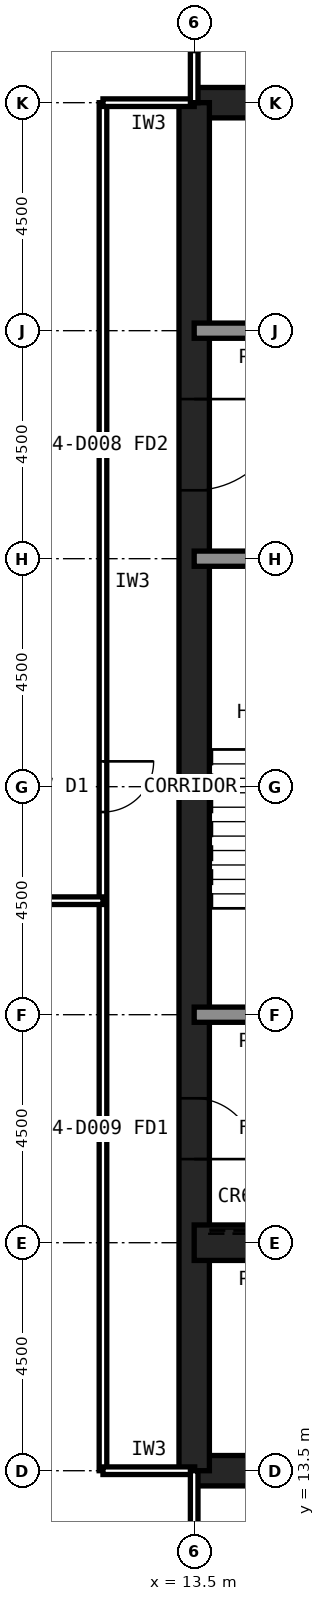
"""IFC4 building model, lengths in metres.
Left out: names, types, materials, properties, quantities, classifications, styles, units other than length and angle.
Written with IfcOpenShell. Run it as: python <this file> out.ifc"""

import sys

from ifc_helpers import new_model, si_unit, direction, frame, frame_2d, origin, place, context, subcontext, project, spatial, rectangle, extrude, element, fill, save


model = new_model("IFC4")
c1 = context("Model", 3, precision=1e-05, world=origin(), true_north=direction((0.0, 1.0)))
c2 = subcontext(c1, "Body", "Model", "MODEL_VIEW")
j1 = project(units=[si_unit("LENGTHUNIT", "METRE"), si_unit("PLANEANGLEUNIT", "RADIAN")], contexts=[c1])
p1 = place(None, origin())
s1 = spatial("IfcSite", under=j1, at=p1, CompositionType="ELEMENT")
p2 = place(p1, origin())
s2 = spatial("IfcBuilding", under=s1, at=p2, CompositionType="ELEMENT")
p3 = place(p2, frame((0.0, 0.0, 62.6)))
s3 = spatial("IfcBuildingStorey", under=s2, at=p3, CompositionType="ELEMENT", Elevation=62.6)
for number, where, z_axis, x_axis in (
    (1, (13.5, 13.5, 0.0), (0.0, 0.0, 1.0), (1.0, 0.0, 0.0)),
    (2, (40.5, 40.5, 0.0), (0.0, 0.0, 1.0), (-1.0, 0.0, 0.0)),
):
    element("IfcWall", number, at=place(p3, frame(where, z_axis=z_axis, x_axis=x_axis)), inside=s3, PredefinedType="SHEAR", context=c2, shape_type="SweptSolid", body=[
        extrude(rectangle(XDim=27.0, YDim=0.6, at=frame_2d((13.5, 0.0))), origin(), (0.0, 0.0, 1.0), 4.2),
    ])
p4 = place(p3, frame((13.5, 40.5, 0.0), z_axis=(0.0, 0.0, 1.0), x_axis=(0.0, -1.0, 0.0)))
e3 = element("IfcWall", 3, at=p4, inside=s3, PredefinedType="SHEAR", context=c2, shape_type="SweptSolid", body=[
    extrude(rectangle(XDim=27.0, YDim=0.6, at=frame_2d((13.5, 0.0))), origin(), (0.0, 0.0, 1.0), 4.2),
])
p5 = place(p4, frame((19.65, 0.0, 0.0)))
e4 = element("IfcOpeningElement", 4, at=p5, cuts=e3, PredefinedType="OPENING", context=c2, shape_type="SweptSolid", body=[
    extrude(rectangle(XDim=1.2, YDim=2.1, at=frame_2d((0.6, 1.05))), frame((0.0, 0.31, 0.0), z_axis=(0.0, -1.0, 0.0), x_axis=(1.0, 0.0, 0.0)), (0.0, 0.0, 1.0), 0.62),
])
p6 = place(p4, frame((5.85, 0.0, 0.0)))
e5 = element("IfcOpeningElement", 5, at=p6, cuts=e3, PredefinedType="OPENING", context=c2, shape_type="SweptSolid", body=[
    extrude(rectangle(XDim=1.8, YDim=2.1, at=frame_2d((0.9, 1.05))), frame((0.0, 0.31, 0.0), z_axis=(0.0, -1.0, 0.0), x_axis=(1.0, 0.0, 0.0)), (0.0, 0.0, 1.0), 0.62),
])
p7 = place(p3, frame((13.5, 18.0, 0.0), z_axis=(0.0, 0.0, 1.0), x_axis=(1.0, 0.0, 0.0)))
e6 = element("IfcWall", 6, at=p7, inside=s3, PredefinedType="SHEAR", context=c2, shape_type="SweptSolid", body=[
    extrude(rectangle(XDim=27.0, YDim=0.7, at=frame_2d((13.5, 0.0))), origin(), (0.0, 0.0, 1.0), 4.2),
])
p8 = place(p7, frame((24.3, 0.0, 0.0)))
e7 = element("IfcOpeningElement", 7, at=p8, cuts=e6, PredefinedType="OPENING", context=c2, shape_type="SweptSolid", body=[
    extrude(rectangle(XDim=0.9, YDim=2.1, at=frame_2d((0.45, 1.05))), frame((0.0, 0.36, 0.0), z_axis=(0.0, -1.0, 0.0), x_axis=(1.0, 0.0, 0.0)), (0.0, 0.0, 1.0), 0.72),
])
p9 = place(p7, frame((5.45, 0.0, 0.0)))
e8 = element("IfcOpeningElement", 8, at=p9, cuts=e6, PredefinedType="OPENING", context=c2, shape_type="SweptSolid", body=[
    extrude(rectangle(XDim=1.1, YDim=2.1, at=frame_2d((0.55, 1.05))), frame((0.0, 0.36, 0.0), z_axis=(0.0, -1.0, 0.0), x_axis=(1.0, 0.0, 0.0)), (0.0, 0.0, 1.0), 0.72),
])
p10 = place(p7, frame((8.45, 0.0, 0.0)))
e9 = element("IfcOpeningElement", 9, at=p10, cuts=e6, PredefinedType="OPENING", context=c2, shape_type="SweptSolid", body=[
    extrude(rectangle(XDim=1.1, YDim=2.1, at=frame_2d((0.55, 1.05))), frame((0.0, 0.36, 0.0), z_axis=(0.0, -1.0, 0.0), x_axis=(1.0, 0.0, 0.0)), (0.0, 0.0, 1.0), 0.72),
])
p11 = place(p7, frame((11.45, 0.0, 0.0)))
e10 = element("IfcOpeningElement", 10, at=p11, cuts=e6, PredefinedType="OPENING", context=c2, shape_type="SweptSolid", body=[
    extrude(rectangle(XDim=1.1, YDim=2.1, at=frame_2d((0.55, 1.05))), frame((0.0, 0.36, 0.0), z_axis=(0.0, -1.0, 0.0), x_axis=(1.0, 0.0, 0.0)), (0.0, 0.0, 1.0), 0.72),
])
p12 = place(p7, frame((14.45, 0.0, 0.0)))
e11 = element("IfcOpeningElement", 11, at=p12, cuts=e6, PredefinedType="OPENING", context=c2, shape_type="SweptSolid", body=[
    extrude(rectangle(XDim=1.1, YDim=2.1, at=frame_2d((0.55, 1.05))), frame((0.0, 0.36, 0.0), z_axis=(0.0, -1.0, 0.0), x_axis=(1.0, 0.0, 0.0)), (0.0, 0.0, 1.0), 0.72),
])
p13 = place(p7, frame((17.45, 0.0, 0.0)))
e12 = element("IfcOpeningElement", 12, at=p13, cuts=e6, PredefinedType="OPENING", context=c2, shape_type="SweptSolid", body=[
    extrude(rectangle(XDim=1.1, YDim=2.1, at=frame_2d((0.55, 1.05))), frame((0.0, 0.36, 0.0), z_axis=(0.0, -1.0, 0.0), x_axis=(1.0, 0.0, 0.0)), (0.0, 0.0, 1.0), 0.72),
])
p14 = place(p7, frame((20.45, 0.0, 0.0)))
e13 = element("IfcOpeningElement", 13, at=p14, cuts=e6, PredefinedType="OPENING", context=c2, shape_type="SweptSolid", body=[
    extrude(rectangle(XDim=1.1, YDim=2.1, at=frame_2d((0.55, 1.05))), frame((0.0, 0.36, 0.0), z_axis=(0.0, -1.0, 0.0), x_axis=(1.0, 0.0, 0.0)), (0.0, 0.0, 1.0), 0.72),
])
p15 = place(p7, frame((1.6, 0.0, 0.0)))
e14 = element("IfcOpeningElement", 14, at=p15, cuts=e6, PredefinedType="OPENING", context=c2, shape_type="SweptSolid", body=[
    extrude(rectangle(XDim=1.3, YDim=2.2, at=frame_2d((0.65, 1.1))), frame((0.0, 0.36, 0.0), z_axis=(0.0, -1.0, 0.0), x_axis=(1.0, 0.0, 0.0)), (0.0, 0.0, 1.0), 0.72),
])
p16 = place(p3, frame((13.5, 36.0, 0.0), z_axis=(0.0, 0.0, 1.0), x_axis=(1.0, 0.0, 0.0)))
e15 = element("IfcWall", 15, at=p16, inside=s3, PredefinedType="SOLIDWALL", context=c2, shape_type="SweptSolid", body=[
    extrude(rectangle(XDim=27.0, YDim=0.3, at=frame_2d((13.5, 0.0))), origin(), (0.0, 0.0, 1.0), 4.04),
])
p17 = place(p16, frame((1.8, 0.0, 0.0)))
e16 = element("IfcOpeningElement", 16, at=p17, cuts=e15, PredefinedType="OPENING", context=c2, shape_type="SweptSolid", body=[
    extrude(rectangle(XDim=0.9, YDim=2.1, at=frame_2d((0.45, 1.05))), frame((0.0, 0.16, 0.0), z_axis=(0.0, -1.0, 0.0), x_axis=(1.0, 0.0, 0.0)), (0.0, 0.0, 1.0), 0.32),
])
p18 = place(p16, frame((24.1, 0.0, 0.0)))
e17 = element("IfcOpeningElement", 17, at=p18, cuts=e15, PredefinedType="OPENING", context=c2, shape_type="SweptSolid", body=[
    extrude(rectangle(XDim=1.3, YDim=2.2, at=frame_2d((0.65, 1.1))), frame((0.0, 0.16, 0.0), z_axis=(0.0, -1.0, 0.0), x_axis=(1.0, 0.0, 0.0)), (0.0, 0.0, 1.0), 0.32),
])
p19 = place(p3, frame((13.5, 22.5, 0.0), z_axis=(0.0, 0.0, 1.0), x_axis=(1.0, 0.0, 0.0)))
e18 = element("IfcWall", 18, at=p19, inside=s3, PredefinedType="SOLIDWALL", context=c2, shape_type="SweptSolid", body=[
    extrude(rectangle(XDim=27.0, YDim=0.3, at=frame_2d((13.5, 0.0))), origin(), (0.0, 0.0, 1.0), 4.04),
])
p20 = place(p19, frame((1.65, 0.0, 0.0)))
e19 = element("IfcOpeningElement", 19, at=p20, cuts=e18, PredefinedType="OPENING", context=c2, shape_type="SweptSolid", body=[
    extrude(rectangle(XDim=1.2, YDim=2.1, at=frame_2d((0.6, 1.05))), frame((0.0, 0.16, 0.0), z_axis=(0.0, -1.0, 0.0), x_axis=(1.0, 0.0, 0.0)), (0.0, 0.0, 1.0), 0.32),
])
p21 = place(p19, frame((6.025, 0.0, 0.0)))
e20 = element("IfcOpeningElement", 20, at=p21, cuts=e18, PredefinedType="OPENING", context=c2, shape_type="SweptSolid", body=[
    extrude(rectangle(XDim=1.0, YDim=2.1, at=frame_2d((0.5, 1.05))), frame((0.0, 0.16, 0.0), z_axis=(0.0, -1.0, 0.0), x_axis=(1.0, 0.0, 0.0)), (0.0, 0.0, 1.0), 0.32),
])
p22 = place(p19, frame((10.525, 0.0, 0.0)))
e21 = element("IfcOpeningElement", 21, at=p22, cuts=e18, PredefinedType="OPENING", context=c2, shape_type="SweptSolid", body=[
    extrude(rectangle(XDim=1.0, YDim=2.1, at=frame_2d((0.5, 1.05))), frame((0.0, 0.16, 0.0), z_axis=(0.0, -1.0, 0.0), x_axis=(1.0, 0.0, 0.0)), (0.0, 0.0, 1.0), 0.32),
])
p23 = place(p19, frame((19.75, 0.0, 0.0)))
e22 = element("IfcOpeningElement", 22, at=p23, cuts=e18, PredefinedType="OPENING", context=c2, shape_type="SweptSolid", body=[
    extrude(rectangle(XDim=1.0, YDim=2.1, at=frame_2d((0.5, 1.05))), frame((0.0, 0.16, 0.0), z_axis=(0.0, -1.0, 0.0), x_axis=(1.0, 0.0, 0.0)), (0.0, 0.0, 1.0), 0.32),
])
p24 = place(p19, frame((15.05, 0.0, 0.0)))
e23 = element("IfcOpeningElement", 23, at=p24, cuts=e18, PredefinedType="OPENING", context=c2, shape_type="SweptSolid", body=[
    extrude(rectangle(XDim=1.4, YDim=2.4, at=frame_2d((0.7, 1.2))), frame((0.0, 0.16, 0.0), z_axis=(0.0, -1.0, 0.0), x_axis=(1.0, 0.0, 0.0)), (0.0, 0.0, 1.0), 0.32),
])
p25 = place(p3, frame((13.5, 31.5, 0.0), z_axis=(0.0, 0.0, 1.0), x_axis=(1.0, 0.0, 0.0)))
e24 = element("IfcWall", 24, at=p25, inside=s3, PredefinedType="SOLIDWALL", context=c2, shape_type="SweptSolid", body=[
    extrude(rectangle(XDim=27.0, YDim=0.3, at=frame_2d((13.5, 0.0))), origin(), (0.0, 0.0, 1.0), 4.04),
])
p26 = place(p25, frame((24.15, 0.0, 0.0)))
e25 = element("IfcOpeningElement", 25, at=p26, cuts=e24, PredefinedType="OPENING", context=c2, shape_type="SweptSolid", body=[
    extrude(rectangle(XDim=1.2, YDim=2.1, at=frame_2d((0.6, 1.05))), frame((0.0, 0.16, 0.0), z_axis=(0.0, -1.0, 0.0), x_axis=(1.0, 0.0, 0.0)), (0.0, 0.0, 1.0), 0.32),
])
p27 = place(p25, frame((15.3, 0.0, 0.0)))
e26 = element("IfcOpeningElement", 26, at=p27, cuts=e24, PredefinedType="OPENING", context=c2, shape_type="SweptSolid", body=[
    extrude(rectangle(XDim=0.9, YDim=2.1, at=frame_2d((0.45, 1.05))), frame((0.0, 0.16, 0.0), z_axis=(0.0, -1.0, 0.0), x_axis=(1.0, 0.0, 0.0)), (0.0, 0.0, 1.0), 0.32),
])
p28 = place(p25, frame((19.8, 0.0, 0.0)))
e27 = element("IfcOpeningElement", 27, at=p28, cuts=e24, PredefinedType="OPENING", context=c2, shape_type="SweptSolid", body=[
    extrude(rectangle(XDim=0.9, YDim=2.1, at=frame_2d((0.45, 1.05))), frame((0.0, 0.16, 0.0), z_axis=(0.0, -1.0, 0.0), x_axis=(1.0, 0.0, 0.0)), (0.0, 0.0, 1.0), 0.32),
])
p29 = place(p3, frame((11.7, 40.5, 0.0), z_axis=(0.0, 0.0, 1.0), x_axis=(0.0, -1.0, 0.0)))
e28 = element("IfcWall", 28, at=p29, inside=s3, PredefinedType="PARTITIONING", context=c2, shape_type="SweptSolid", body=[
    extrude(rectangle(XDim=27.0, YDim=0.15, at=frame_2d((13.5, 0.0))), origin(), (0.0, 0.0, 1.0), 4.04),
])
p30 = place(p29, frame((13.0, 0.0, 0.0)))
e29 = element("IfcOpeningElement", 29, at=p30, cuts=e28, PredefinedType="OPENING", context=c2, shape_type="SweptSolid", body=[
    extrude(rectangle(XDim=1.0, YDim=2.1, at=frame_2d((0.5, 1.05))), frame((0.0, 0.085, 0.0), z_axis=(0.0, -1.0, 0.0), x_axis=(1.0, 0.0, 0.0)), (0.0, 0.0, 1.0), 0.17),
])
p31 = place(p3, frame((11.7, 13.5, 0.0), z_axis=(0.0, 0.0, 1.0), x_axis=(1.0, 0.0, 0.0)))
e30 = element("IfcWall", 30, at=p31, inside=s3, PredefinedType="PARTITIONING", context=c2, shape_type="SweptSolid", body=[
    extrude(rectangle(XDim=1.81, YDim=0.15, at=frame_2d((0.905, 0.0))), origin(), (0.0, 0.0, 1.0), 3.189),
])
p32 = place(p3, frame((13.5, 40.5, 0.0), z_axis=(0.0, 0.0, 1.0), x_axis=(-1.0, 0.0, 0.0)))
e31 = element("IfcWall", 31, at=p32, inside=s3, PredefinedType="PARTITIONING", context=c2, shape_type="SweptSolid", body=[
    extrude(rectangle(XDim=1.8, YDim=0.15, at=frame_2d((0.9, 0.0))), origin(), (0.0, 0.0, 1.0), 3.189),
])
p33 = place(p3, frame((13.5, 43.5, 0.0), z_axis=(0.0, 0.0, 1.0), x_axis=(0.0, -1.0, 0.0)))
e32 = element("IfcWall", 32, at=p33, inside=s3, PredefinedType="PARTITIONING", context=c2, shape_type="SweptSolid", body=[
    extrude(rectangle(XDim=3.0, YDim=0.15, at=frame_2d((1.5, 0.0))), origin(), (0.0, 0.0, 1.0), 3.189),
])
p34 = place(p33, frame((1.0, 0.0, 0.0)))
e33 = element("IfcOpeningElement", 33, at=p34, cuts=e32, PredefinedType="OPENING", context=c2, shape_type="SweptSolid", body=[
    extrude(rectangle(XDim=1.0, YDim=2.1, at=frame_2d((0.5, 1.05))), frame((0.0, 0.085, 0.0), z_axis=(0.0, -1.0, 0.0), x_axis=(1.0, 0.0, 0.0)), (0.0, 0.0, 1.0), 0.17),
])
p35 = place(p3, frame((11.7, 24.75, 0.0), z_axis=(0.0, 0.0, 1.0), x_axis=(-1.0, 0.0, 0.0)))
e34 = element("IfcWall", 34, at=p35, inside=s3, PredefinedType="PARTITIONING", context=c2, shape_type="SweptSolid", body=[
    extrude(rectangle(XDim=7.2, YDim=0.15, at=frame_2d((3.6, 0.0))), origin(), (0.0, 0.0, 1.0), 4.04),
])
p36 = place(p35, frame((3.1, 0.0, 0.0)))
e35 = element("IfcOpeningElement", 35, at=p36, cuts=e34, PredefinedType="OPENING", context=c2, shape_type="SweptSolid", body=[
    extrude(rectangle(XDim=1.0, YDim=2.1, at=frame_2d((0.5, 1.05))), frame((0.0, 0.085, 0.0), z_axis=(0.0, -1.0, 0.0), x_axis=(1.0, 0.0, 0.0)), (0.0, 0.0, 1.0), 0.17),
])
p37 = place(p3, frame((13.5, 0.445, 0.0), z_axis=(0.0, 0.0, 1.0), x_axis=(0.0, 1.0, 0.0)))
e36 = element("IfcWall", 36, at=p37, inside=s3, PredefinedType="PARTITIONING", context=c2, shape_type="SweptSolid", body=[
    extrude(rectangle(XDim=13.055, YDim=0.15, at=frame_2d((6.527, 0.0))), origin(), (0.0, 0.0, 1.0), 3.189),
])
p38 = place(p37, frame((6.028, 0.0, 0.0)))
e37 = element("IfcOpeningElement", 37, at=p38, cuts=e36, PredefinedType="OPENING", context=c2, shape_type="SweptSolid", body=[
    extrude(rectangle(XDim=1.0, YDim=2.1, at=frame_2d((0.5, 1.05))), frame((0.0, 0.085, 0.0), z_axis=(0.0, -1.0, 0.0), x_axis=(1.0, 0.0, 0.0)), (0.0, 0.0, 1.0), 0.17),
])
p39 = place(p5, origin())
e38 = element("IfcDoor", 38, at=p39, inside=s3, OperationType="SINGLE_SWING_RIGHT", PredefinedType="DOOR", context=c2, shape_type="SweptSolid", body=[
    extrude(rectangle(XDim=1.2, YDim=2.1, at=frame_2d((0.6, 1.05))), frame((0.0, 0.025, 0.0), z_axis=(0.0, -1.0, 0.0), x_axis=(1.0, 0.0, 0.0)), (0.0, 0.0, 1.0), 0.05),
])
fill(e4, e38)
p40 = place(p6, origin())
e39 = element("IfcDoor", 39, at=p40, inside=s3, OperationType="SINGLE_SWING_LEFT", PredefinedType="DOOR", context=c2, shape_type="SweptSolid", body=[
    extrude(rectangle(XDim=1.8, YDim=2.1, at=frame_2d((0.9, 1.05))), frame((0.0, 0.025, 0.0), z_axis=(0.0, -1.0, 0.0), x_axis=(1.0, 0.0, 0.0)), (0.0, 0.0, 1.0), 0.05),
])
fill(e5, e39)
p41 = place(p30, origin())
e40 = element("IfcDoor", 40, at=p41, inside=s3, OperationType="SINGLE_SWING_LEFT", PredefinedType="DOOR", context=c2, shape_type="SweptSolid", body=[
    extrude(rectangle(XDim=1.0, YDim=2.1, at=frame_2d((0.5, 1.05))), frame((0.0, 0.025, 0.0), z_axis=(0.0, -1.0, 0.0), x_axis=(1.0, 0.0, 0.0)), (0.0, 0.0, 1.0), 0.05),
])
fill(e29, e40)
save(model, sys.argv[1])
